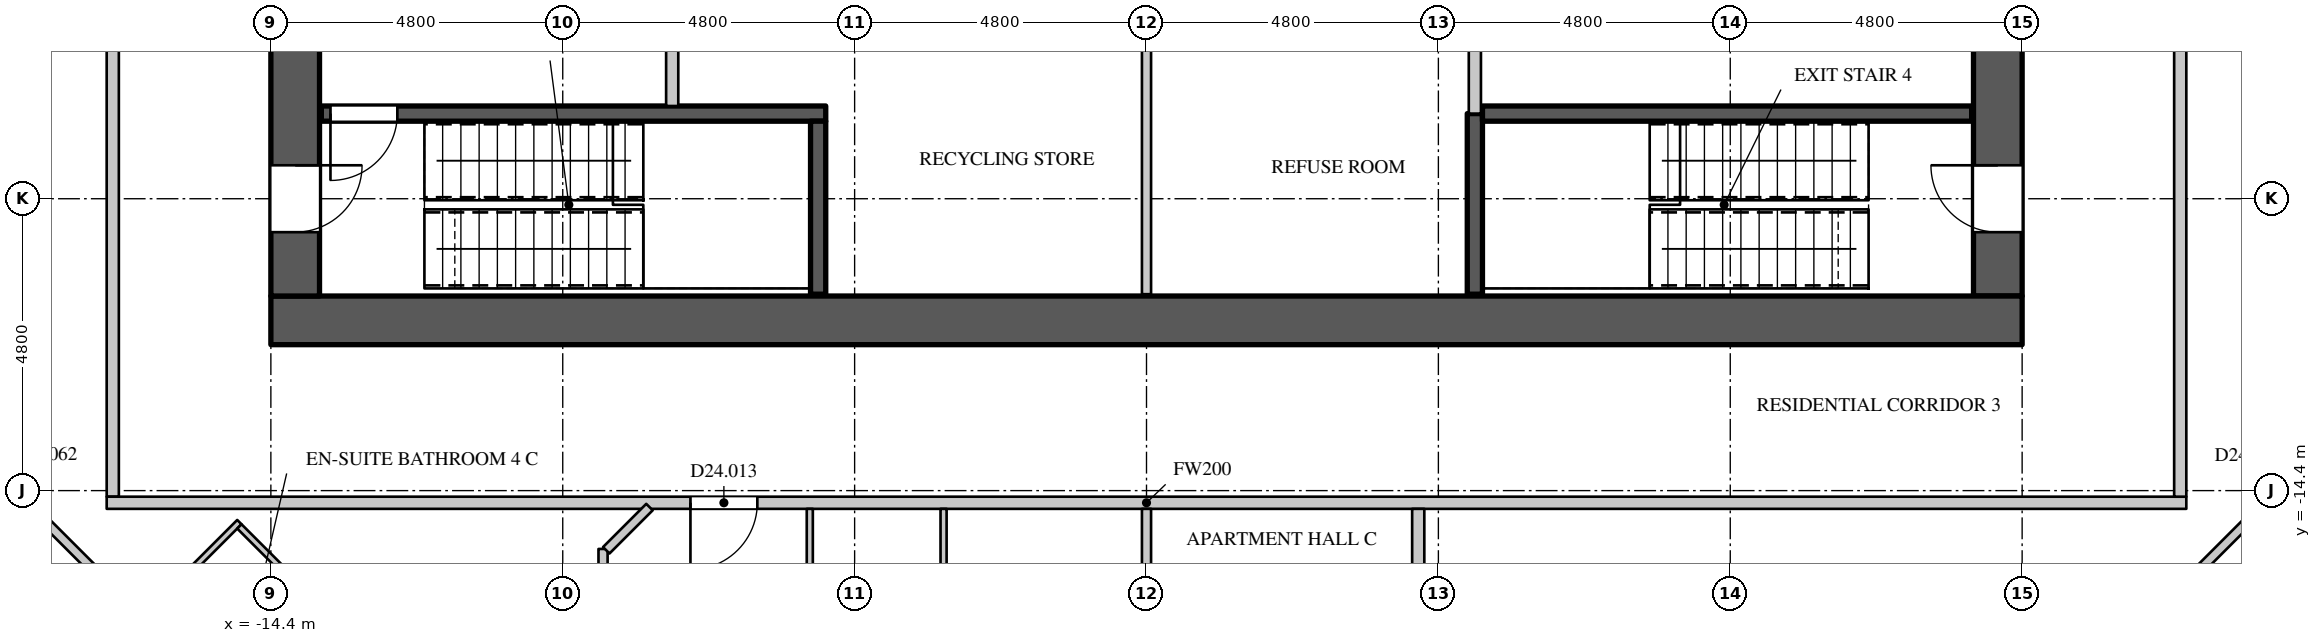
"""IFC4 building model, lengths in metres.
Left out: names, types, materials, properties, quantities, classifications, styles, units other than length and angle.
Written with IfcOpenShell. Run it as: python <this file> out.ifc"""

import sys

from ifc_helpers import new_model, si_unit, direction, frame, frame_2d, origin, place, context, subcontext, project, spatial, rectangle, extrude, element, fill, save


model = new_model("IFC4")
c1 = context("Model", 3, precision=1e-05, world=origin(), true_north=direction((0.0, 1.0)))
c2 = subcontext(c1, "Body", "Model", "MODEL_VIEW")
j1 = project(units=[si_unit("LENGTHUNIT", "METRE"), si_unit("PLANEANGLEUNIT", "RADIAN")], contexts=[c1])
p1 = place(None, origin())
s1 = spatial("IfcSite", under=j1, at=p1, CompositionType="ELEMENT")
p2 = place(p1, origin())
s2 = spatial("IfcBuilding", under=s1, at=p2, CompositionType="ELEMENT")
p3 = place(p2, frame((0.0, 0.0, 106.5)))
s3 = spatial("IfcBuildingStorey", under=s2, at=p3, CompositionType="ELEMENT", Elevation=106.5)
p4 = place(p3, frame((-14.4, -11.6, 0.0), z_axis=(0.0, 0.0, 1.0), x_axis=(1.0, 0.0, 0.0)))
e1 = element("IfcWall", 1, at=p4, inside=s3, PredefinedType="SHEAR", context=c2, shape_type="SweptSolid", body=[
    extrude(rectangle(XDim=28.8, YDim=0.8, at=frame_2d((14.4, 0.0))), origin(), (0.0, 0.0, 1.0), 4.2),
])
p5 = place(p3, frame((14.0, -11.2, 0.0), z_axis=(0.0, 0.0, 1.0), x_axis=(0.0, 1.0, 0.0)))
e2 = element("IfcWall", 2, at=p5, inside=s3, PredefinedType="SHEAR", context=c2, shape_type="SweptSolid", body=[
    extrude(rectangle(XDim=22.4, YDim=0.8, at=frame_2d((11.2, 0.0))), origin(), (0.0, 0.0, 1.0), 4.2),
])
p6 = place(p5, frame((20.25, 0.0, 0.0)))
e3 = element("IfcOpeningElement", 3, at=p6, cuts=e2, PredefinedType="OPENING", context=c2, shape_type="SweptSolid", body=[
    extrude(rectangle(XDim=1.1, YDim=2.2, at=frame_2d((0.55, 1.1))), frame((0.0, 0.41, 0.0), z_axis=(0.0, -1.0, 0.0), x_axis=(1.0, 0.0, 0.0)), (0.0, 0.0, 1.0), 0.82),
])
p7 = place(p5, frame((1.05, 0.0, 0.0)))
e4 = element("IfcOpeningElement", 4, at=p7, cuts=e2, PredefinedType="OPENING", context=c2, shape_type="SweptSolid", body=[
    extrude(rectangle(XDim=1.1, YDim=2.2, at=frame_2d((0.55, 1.1))), frame((0.0, 0.41, 0.0), z_axis=(0.0, -1.0, 0.0), x_axis=(1.0, 0.0, 0.0)), (0.0, 0.0, 1.0), 0.82),
])
p8 = place(p5, frame((14.75, 0.0, 0.0)))
e5 = element("IfcOpeningElement", 5, at=p8, cuts=e2, PredefinedType="OPENING", context=c2, shape_type="SweptSolid", body=[
    extrude(rectangle(XDim=1.5, YDim=2.4, at=frame_2d((0.75, 1.2))), frame((0.0, 0.41, 0.0), z_axis=(0.0, -1.0, 0.0), x_axis=(1.0, 0.0, 0.0)), (0.0, 0.0, 1.0), 0.82),
])
p9 = place(p5, frame((6.15, 0.0, 0.0)))
e6 = element("IfcOpeningElement", 6, at=p9, cuts=e2, PredefinedType="OPENING", context=c2, shape_type="SweptSolid", body=[
    extrude(rectangle(XDim=1.5, YDim=2.4, at=frame_2d((0.75, 1.2))), frame((0.0, 0.41, 0.0), z_axis=(0.0, -1.0, 0.0), x_axis=(1.0, 0.0, 0.0)), (0.0, 0.0, 1.0), 0.82),
])
p10 = place(p3, frame((-14.0, -11.2, 0.0), z_axis=(0.0, 0.0, 1.0), x_axis=(0.0, 1.0, 0.0)))
e7 = element("IfcWall", 7, at=p10, inside=s3, PredefinedType="SHEAR", context=c2, shape_type="SweptSolid", body=[
    extrude(rectangle(XDim=22.4, YDim=0.8, at=frame_2d((11.2, 0.0))), origin(), (0.0, 0.0, 1.0), 4.2),
])
p11 = place(p10, frame((20.25, 0.0, 0.0)))
e8 = element("IfcOpeningElement", 8, at=p11, cuts=e7, PredefinedType="OPENING", context=c2, shape_type="SweptSolid", body=[
    extrude(rectangle(XDim=1.1, YDim=2.2, at=frame_2d((0.55, 1.1))), frame((0.0, 0.41, 0.0), z_axis=(0.0, -1.0, 0.0), x_axis=(1.0, 0.0, 0.0)), (0.0, 0.0, 1.0), 0.82),
])
p12 = place(p10, frame((1.05, 0.0, 0.0)))
e9 = element("IfcOpeningElement", 9, at=p12, cuts=e7, PredefinedType="OPENING", context=c2, shape_type="SweptSolid", body=[
    extrude(rectangle(XDim=1.1, YDim=2.2, at=frame_2d((0.55, 1.1))), frame((0.0, 0.41, 0.0), z_axis=(0.0, -1.0, 0.0), x_axis=(1.0, 0.0, 0.0)), (0.0, 0.0, 1.0), 0.82),
])
p13 = place(p10, frame((15.95, 0.0, 0.0)))
e10 = element("IfcOpeningElement", 10, at=p13, cuts=e7, PredefinedType="OPENING", context=c2, shape_type="SweptSolid", body=[
    extrude(rectangle(XDim=1.5, YDim=2.4, at=frame_2d((0.75, 1.2))), frame((0.0, 0.41, 0.0), z_axis=(0.0, -1.0, 0.0), x_axis=(1.0, 0.0, 0.0)), (0.0, 0.0, 1.0), 0.82),
])
p14 = place(p10, frame((4.95, 0.0, 0.0)))
e11 = element("IfcOpeningElement", 11, at=p14, cuts=e7, PredefinedType="OPENING", context=c2, shape_type="SweptSolid", body=[
    extrude(rectangle(XDim=1.5, YDim=2.4, at=frame_2d((0.75, 1.2))), frame((0.0, 0.41, 0.0), z_axis=(0.0, -1.0, 0.0), x_axis=(1.0, 0.0, 0.0)), (0.0, 0.0, 1.0), 0.82),
])
p15 = place(p3, frame((-17.0, -14.5, 0.0), z_axis=(0.0, 0.0, 1.0), x_axis=(0.0, 1.0, 0.0)))
e12 = element("IfcWall", 12, at=p15, inside=s3, PredefinedType="PARTITIONING", context=c2, shape_type="SweptSolid", body=[
    extrude(rectangle(XDim=29.0, YDim=0.2, at=frame_2d((14.5, 0.0))), origin(), (0.0, 0.0, 1.0), 3.95),
])
p16 = place(p15, frame((11.5, 0.0, 0.0)))
e13 = element("IfcOpeningElement", 13, at=p16, cuts=e12, PredefinedType="OPENING", context=c2, shape_type="SweptSolid", body=[
    extrude(rectangle(XDim=1.1, YDim=2.4, at=frame_2d((0.55, 1.2))), frame((0.0, 0.11, 0.0), z_axis=(0.0, -1.0, 0.0), x_axis=(1.0, 0.0, 0.0)), (0.0, 0.0, 1.0), 0.22),
])
p17 = place(p3, frame((-17.1, -14.6, 0.0), z_axis=(0.0, 0.0, 1.0), x_axis=(1.0, 0.0, 0.0)))
e14 = element("IfcWall", 14, at=p17, inside=s3, PredefinedType="PARTITIONING", context=c2, shape_type="SweptSolid", body=[
    extrude(rectangle(XDim=34.2, YDim=0.2, at=frame_2d((17.1, 0.0))), origin(), (0.0, 0.0, 1.0), 3.95),
])
p18 = place(p17, frame((9.6, 0.0, 0.0)))
e15 = element("IfcOpeningElement", 15, at=p18, cuts=e14, PredefinedType="OPENING", context=c2, shape_type="SweptSolid", body=[
    extrude(rectangle(XDim=1.1, YDim=2.4, at=frame_2d((0.55, 1.2))), frame((0.0, 0.11, 0.0), z_axis=(0.0, -1.0, 0.0), x_axis=(1.0, 0.0, 0.0)), (0.0, 0.0, 1.0), 0.22),
])
p19 = place(p3, frame((-7.8, -8.075, 0.0), z_axis=(0.0, 0.0, 1.0), x_axis=(0.0, 1.0, 0.0)))
e16 = element("IfcWall", 16, at=p19, inside=s3, PredefinedType="PARTITIONING", context=c2, shape_type="SweptSolid", body=[
    extrude(rectangle(XDim=5.275, YDim=0.2, at=frame_2d((2.637, 0.0))), origin(), (0.0, 0.0, 1.0), 3.95),
])
p20 = place(p19, frame((3.0, 0.0, 0.0)))
e17 = element("IfcOpeningElement", 17, at=p20, cuts=e16, PredefinedType="OPENING", context=c2, shape_type="SweptSolid", body=[
    extrude(rectangle(XDim=1.5, YDim=2.4, at=frame_2d((0.75, 1.2))), frame((0.0, 0.11, 0.0), z_axis=(0.0, -1.0, 0.0), x_axis=(1.0, 0.0, 0.0)), (0.0, 0.0, 1.0), 0.22),
])
p21 = place(p3, frame((17.0, -14.5, 0.0), z_axis=(0.0, 0.0, 1.0), x_axis=(0.0, 1.0, 0.0)))
e18 = element("IfcWall", 18, at=p21, inside=s3, PredefinedType="PARTITIONING", context=c2, shape_type="SweptSolid", body=[
    extrude(rectangle(XDim=29.0, YDim=0.2, at=frame_2d((14.5, 0.0))), origin(), (0.0, 0.0, 1.0), 3.95),
])
p22 = place(p21, frame((11.55, 0.0, 0.0)))
e19 = element("IfcOpeningElement", 19, at=p22, cuts=e18, PredefinedType="OPENING", context=c2, shape_type="SweptSolid", body=[
    extrude(rectangle(XDim=1.1, YDim=2.4, at=frame_2d((0.55, 1.2))), frame((0.0, 0.11, 0.0), z_axis=(0.0, -1.0, 0.0), x_axis=(1.0, 0.0, 0.0)), (0.0, 0.0, 1.0), 0.22),
])
p23 = place(p3, frame((-21.547, -11.471, 0.0), z_axis=(0.0, 0.0, 1.0), x_axis=(0.707106781187, -0.707106781187, 0.0)))
e20 = element("IfcWall", 20, at=p23, inside=s3, PredefinedType="PARTITIONING", context=c2, shape_type="SweptSolid", body=[
    extrude(rectangle(XDim=7.125, YDim=0.15, at=frame_2d((3.562, 0.0))), origin(), (0.0, 0.0, 1.0), 3.95),
])
p24 = place(p23, frame((2.85, 0.0, 0.0)))
e21 = element("IfcOpeningElement", 21, at=p24, cuts=e20, PredefinedType="OPENING", context=c2, shape_type="SweptSolid", body=[
    extrude(rectangle(XDim=0.95, YDim=2.2, at=frame_2d((0.475, 1.1))), frame((0.0, 0.085, 0.0), z_axis=(0.0, -1.0, 0.0), x_axis=(1.0, 0.0, 0.0)), (0.0, 0.0, 1.0), 0.17),
])
p25 = place(p3, frame((-8.937, -26.455, 0.0), z_axis=(0.0, 0.0, 1.0), x_axis=(0.0, 1.0, 0.0)))
e22 = element("IfcWall", 22, at=p25, inside=s3, PredefinedType="PARTITIONING", context=c2, shape_type="SweptSolid", body=[
    extrude(rectangle(XDim=11.096, YDim=0.15, at=frame_2d((5.548, 0.0))), origin(), (0.0, 0.0, 1.0), 3.95),
])
p26 = place(p25, frame((8.5, 0.0, 0.0)))
e23 = element("IfcOpeningElement", 23, at=p26, cuts=e22, PredefinedType="OPENING", context=c2, shape_type="SweptSolid", body=[
    extrude(rectangle(XDim=0.95, YDim=2.2, at=frame_2d((0.475, 1.1))), frame((0.0, 0.085, 0.0), z_axis=(0.0, -1.0, 0.0), x_axis=(1.0, 0.0, 0.0)), (0.0, 0.0, 1.0), 0.17),
])
p27 = place(p25, frame((1.7, 0.0, 0.0)))
e24 = element("IfcOpeningElement", 24, at=p27, cuts=e22, PredefinedType="OPENING", context=c2, shape_type="SweptSolid", body=[
    extrude(rectangle(XDim=1.5, YDim=2.2, at=frame_2d((0.75, 1.1))), frame((0.0, 0.085, 0.0), z_axis=(0.0, -1.0, 0.0), x_axis=(1.0, 0.0, 0.0)), (0.0, 0.0, 1.0), 0.17),
])
p28 = place(p3, frame((-8.884, -15.381, 0.0), z_axis=(0.0, 0.0, 1.0), x_axis=(0.707106781187, 0.707106781187, 0.0)))
e25 = element("IfcWall", 25, at=p28, inside=s3, PredefinedType="PARTITIONING", context=c2, shape_type="SweptSolid", body=[
    extrude(rectangle(XDim=1.005, YDim=0.15, at=frame_2d((0.502, 0.0))), origin(), (0.0, 0.0, 1.0), 3.95),
])
p29 = place(p3, frame((0.0, -18.82, 0.0), z_axis=(0.0, 0.0, 1.0), x_axis=(0.0, 1.0, 0.0)))
e26 = element("IfcWall", 26, at=p29, inside=s3, PredefinedType="PARTITIONING", context=c2, shape_type="SweptSolid", body=[
    extrude(rectangle(XDim=4.12, YDim=0.15, at=frame_2d((2.06, 0.0))), origin(), (0.0, 0.0, 1.0), 3.95),
])
p30 = place(p29, frame((1.35, 0.0, 0.0)))
e27 = element("IfcOpeningElement", 27, at=p30, cuts=e26, PredefinedType="OPENING", context=c2, shape_type="SweptSolid", body=[
    extrude(rectangle(XDim=0.95, YDim=2.2, at=frame_2d((0.475, 1.1))), frame((0.0, 0.085, 0.0), z_axis=(0.0, -1.0, 0.0), x_axis=(1.0, 0.0, 0.0)), (0.0, 0.0, 1.0), 0.17),
])
p31 = place(p3, frame((0.0, -11.17, 0.0), z_axis=(0.0, 0.0, 1.0), x_axis=(0.0, 1.0, 0.0)))
e28 = element("IfcWall", 28, at=p31, inside=s3, PredefinedType="PARTITIONING", context=c2, shape_type="SweptSolid", body=[
    extrude(rectangle(XDim=5.27, YDim=0.15, at=frame_2d((2.635, 0.0))), origin(), (0.0, 0.0, 1.0), 3.95),
])
p32 = place(p3, frame((15.24, -17.777, 0.0), z_axis=(0.0, 0.0, 1.0), x_axis=(0.707120241298, 0.707093320819, 0.0)))
e29 = element("IfcWall", 29, at=p32, inside=s3, PredefinedType="PARTITIONING", context=c2, shape_type="SweptSolid", body=[
    extrude(rectangle(XDim=9.069, YDim=0.15, at=frame_2d((4.534, 0.0))), origin(), (0.0, 0.0, 1.0), 3.95),
])
p33 = place(p32, frame((5.1, 0.0, 0.0)))
e30 = element("IfcOpeningElement", 30, at=p33, cuts=e29, PredefinedType="OPENING", context=c2, shape_type="SweptSolid", body=[
    extrude(rectangle(XDim=0.95, YDim=2.2, at=frame_2d((0.475, 1.1))), frame((0.0, 0.085, 0.0), z_axis=(0.0, -1.0, 0.0), x_axis=(1.0, 0.0, 0.0)), (0.0, 0.0, 1.0), 0.17),
])
p34 = place(p32, frame((0.4, 0.0, 0.0)))
e31 = element("IfcOpeningElement", 31, at=p34, cuts=e29, PredefinedType="OPENING", context=c2, shape_type="SweptSolid", body=[
    extrude(rectangle(XDim=0.95, YDim=2.2, at=frame_2d((0.475, 1.1))), frame((0.0, 0.085, 0.0), z_axis=(0.0, -1.0, 0.0), x_axis=(1.0, 0.0, 0.0)), (0.0, 0.0, 1.0), 0.17),
])
p35 = place(p32, frame((7.9, 0.0, 0.0)))
e32 = element("IfcOpeningElement", 32, at=p35, cuts=e29, PredefinedType="OPENING", context=c2, shape_type="SweptSolid", body=[
    extrude(rectangle(XDim=0.95, YDim=2.2, at=frame_2d((0.475, 1.1))), frame((0.0, 0.085, 0.0), z_axis=(0.0, -1.0, 0.0), x_axis=(1.0, 0.0, 0.0)), (0.0, 0.0, 1.0), 0.17),
])
p36 = place(p3, frame((4.469, -25.65, 0.0), z_axis=(0.0, 0.0, 1.0), x_axis=(0.0, 1.0, 0.0)))
e33 = element("IfcWall", 33, at=p36, inside=s3, PredefinedType="PARTITIONING", context=c2, shape_type="SweptSolid", body=[
    extrude(rectangle(XDim=10.95, YDim=0.2, at=frame_2d((5.475, 0.0))), origin(), (0.0, 0.0, 1.0), 3.3),
])
p37 = place(p3, frame((5.4, -8.2, 0.0), z_axis=(0.0, 0.0, 1.0), x_axis=(0.0, 1.0, 0.0)))
e34 = element("IfcWall", 34, at=p37, inside=s3, PredefinedType="PARTITIONING", context=c2, shape_type="SweptSolid", body=[
    extrude(rectangle(XDim=2.3, YDim=0.2, at=frame_2d((1.15, 0.0))), origin(), (0.0, 0.0, 1.0), 3.95),
])
p38 = place(p3, frame((-13.57, -8.2, 0.0), z_axis=(0.0, 0.0, 1.0), x_axis=(1.0, 0.0, 0.0)))
e35 = element("IfcWall", 35, at=p38, inside=s3, PredefinedType="SHEAR", context=c2, shape_type="SweptSolid", body=[
    extrude(rectangle(XDim=8.295, YDim=0.25, at=frame_2d((4.147, 0.0))), origin(), (0.0, 0.0, 1.0), 3.95),
])
p39 = place(p38, frame((0.15, 0.0, 0.0)))
e36 = element("IfcOpeningElement", 36, at=p39, cuts=e35, PredefinedType="OPENING", context=c2, shape_type="SweptSolid", body=[
    extrude(rectangle(XDim=1.1, YDim=2.2, at=frame_2d((0.55, 1.1))), frame((0.0, 0.135, 0.0), z_axis=(0.0, -1.0, 0.0), x_axis=(1.0, 0.0, 0.0)), (0.0, 0.0, 1.0), 0.27),
])
p40 = place(p3, frame((-5.4, -11.17, 0.0), z_axis=(0.0, 0.0, 1.0), x_axis=(0.0, 1.0, 0.0)))
e37 = element("IfcWall", 37, at=p40, inside=s3, PredefinedType="SHEAR", context=c2, shape_type="SweptSolid", body=[
    extrude(rectangle(XDim=2.845, YDim=0.25, at=frame_2d((1.422, 0.0))), origin(), (0.0, 0.0, 1.0), 3.95),
])
p41 = place(p3, frame((5.4, -11.17, 0.0), z_axis=(0.0, 0.0, 1.0), x_axis=(0.0, 1.0, 0.0)))
e38 = element("IfcWall", 38, at=p41, inside=s3, PredefinedType="SHEAR", context=c2, shape_type="SweptSolid", body=[
    extrude(rectangle(XDim=2.97, YDim=0.25, at=frame_2d((1.485, 0.0))), origin(), (0.0, 0.0, 1.0), 3.95),
])
p42 = place(p3, frame((5.525, -8.2, 0.0), z_axis=(0.0, 0.0, 1.0), x_axis=(1.0, 0.0, 0.0)))
e39 = element("IfcWall", 39, at=p42, inside=s3, PredefinedType="SHEAR", context=c2, shape_type="SweptSolid", body=[
    extrude(rectangle(XDim=8.045, YDim=0.25, at=frame_2d((4.022, 0.0))), origin(), (0.0, 0.0, 1.0), 3.95),
])
p43 = place(p3, frame((-16.495, -16.495, 0.0), z_axis=(0.0, 0.0, 1.0), x_axis=(0.707106781187, 0.707106781187, 0.0)))
e40 = element("IfcWall", 40, at=p43, inside=s3, PredefinedType="PARTITIONING", context=c2, shape_type="SweptSolid", body=[
    extrude(rectangle(XDim=2.23, YDim=0.1, at=frame_2d((1.115, 0.0))), origin(), (0.0, 0.0, 1.0), 3.95),
])
p44 = place(p3, frame((-14.918, -14.989, 0.0), z_axis=(0.0, 0.0, 1.0), x_axis=(0.707063182409, -0.707150377276, 0.0)))
e41 = element("IfcWall", 41, at=p44, inside=s3, PredefinedType="PARTITIONING", context=c2, shape_type="SweptSolid", body=[
    extrude(rectangle(XDim=2.8, YDim=0.1, at=frame_2d((1.4, 0.0))), origin(), (0.0, 0.0, 1.0), 3.95),
])
p45 = place(p3, frame((-5.537, -20.725, 0.0), z_axis=(0.0, 0.0, 1.0), x_axis=(0.0, 1.0, 0.0)))
e42 = element("IfcWall", 42, at=p45, inside=s3, PredefinedType="PARTITIONING", context=c2, shape_type="SweptSolid", body=[
    extrude(rectangle(XDim=6.025, YDim=0.1, at=frame_2d((3.013, 0.0))), origin(), (0.0, 0.0, 1.0), 3.95),
])
p46 = place(p45, frame((2.55, 0.0, 0.0)))
e43 = element("IfcOpeningElement", 43, at=p46, cuts=e42, PredefinedType="OPENING", context=c2, shape_type="SweptSolid", body=[
    extrude(rectangle(XDim=0.9, YDim=2.2, at=frame_2d((0.45, 1.1))), frame((0.0, 0.06, 0.0), z_axis=(0.0, -1.0, 0.0), x_axis=(1.0, 0.0, 0.0)), (0.0, 0.0, 1.0), 0.12),
])
p47 = place(p3, frame((-3.337, -20.75, 0.0), z_axis=(0.0, 0.0, 1.0), x_axis=(0.0, 1.0, 0.0)))
e44 = element("IfcWall", 44, at=p47, inside=s3, PredefinedType="PARTITIONING", context=c2, shape_type="SweptSolid", body=[
    extrude(rectangle(XDim=6.05, YDim=0.1, at=frame_2d((3.025, 0.0))), origin(), (0.0, 0.0, 1.0), 3.95),
])
p48 = place(p39, origin())
e45 = element("IfcDoor", 45, at=p48, inside=s3, OperationType="SINGLE_SWING_RIGHT", PredefinedType="DOOR", context=c2, shape_type="SweptSolid", body=[
    extrude(rectangle(XDim=1.1, YDim=2.2, at=frame_2d((0.55, 1.1))), frame((0.0, 0.025, 0.0), z_axis=(0.0, -1.0, 0.0), x_axis=(1.0, 0.0, 0.0)), (0.0, 0.0, 1.0), 0.05),
])
fill(e36, e45)
p49 = place(p12, origin())
e46 = element("IfcDoor", 46, at=p49, inside=s3, OperationType="SINGLE_SWING_LEFT", PredefinedType="DOOR", context=c2, shape_type="SweptSolid", body=[
    extrude(rectangle(XDim=1.1, YDim=2.2, at=frame_2d((0.55, 1.1))), frame((0.0, -0.345, 0.0), z_axis=(0.0, -1.0, 0.0), x_axis=(1.0, 0.0, 0.0)), (0.0, 0.0, 1.0), 0.05),
])
fill(e9, e46)
p50 = place(p7, origin())
e47 = element("IfcDoor", 47, at=p50, inside=s3, OperationType="SINGLE_SWING_RIGHT", PredefinedType="DOOR", context=c2, shape_type="SweptSolid", body=[
    extrude(rectangle(XDim=1.1, YDim=2.2, at=frame_2d((0.55, 1.1))), frame((0.0, 0.395, 0.0), z_axis=(0.0, -1.0, 0.0), x_axis=(1.0, 0.0, 0.0)), (0.0, 0.0, 1.0), 0.05),
])
fill(e4, e47)
p51 = place(p18, origin())
e48 = element("IfcDoor", 48, at=p51, inside=s3, OperationType="SINGLE_SWING_RIGHT", PredefinedType="DOOR", context=c2, shape_type="SweptSolid", body=[
    extrude(rectangle(XDim=1.1, YDim=2.4, at=frame_2d((0.55, 1.2))), frame((0.0, 0.025, 0.0), z_axis=(0.0, -1.0, 0.0), x_axis=(1.0, 0.0, 0.0)), (0.0, 0.0, 1.0), 0.05),
])
fill(e15, e48)
save(model, sys.argv[1])
